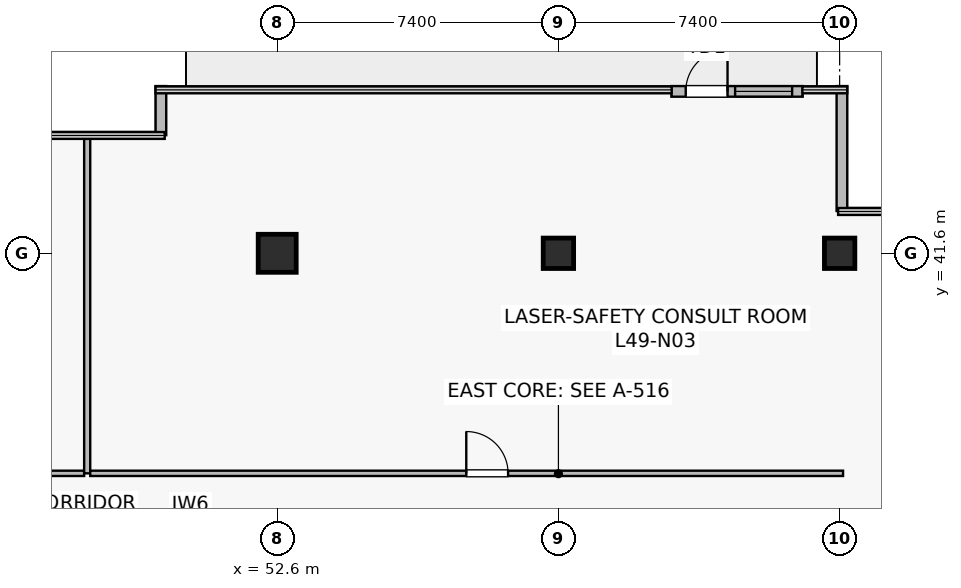
"""IFC4 building model, lengths in metres.
Left out: names, types, materials, properties, quantities, classifications, styles, units other than length and angle.
Written with IfcOpenShell. Run it as: python <this file> out.ifc"""

import sys

from ifc_helpers import new_model, si_unit, direction, frame, frame_2d, origin, origin_2d, place, context, subcontext, project, spatial, rectangle, extrude, source, transform, mapped, element, fill, save


model = new_model("IFC4")
c1 = context("Model", 3, precision=1e-05, world=origin(), true_north=direction((0.0, 1.0)))
c2 = subcontext(c1, "Body", "Model", "MODEL_VIEW")
j1 = project(units=[si_unit("LENGTHUNIT", "METRE"), si_unit("PLANEANGLEUNIT", "RADIAN")], contexts=[c1])
p1 = place(None, origin())
s1 = spatial("IfcSite", under=j1, at=p1, CompositionType="ELEMENT")
p2 = place(p1, origin())
s2 = spatial("IfcBuilding", under=s1, at=p2, CompositionType="ELEMENT")
p3 = place(p2, frame((0.0, 0.0, 205.5)))
s3 = spatial("IfcBuildingStorey", under=s2, at=p3, CompositionType="ELEMENT", Elevation=205.5)
m1 = source(origin(), c2, "Body", "SweptSolid", [
    extrude(rectangle(XDim=1.0, YDim=1.0, at=origin_2d()), origin(), (0.0, 0.0, 1.0), 4.1),
])
p4 = place(p3, frame((52.6, 41.6, 0.0), z_axis=(0.0, 0.0, 1.0), x_axis=(1.0, 0.0, 0.0)))
e1 = element("IfcColumn", 1, at=p4, inside=s3, PredefinedType="COLUMN", context=c2, shape_type="MappedRepresentation", body=[
    mapped(m1, transform((0.0, 0.0, 0.0), scale=1.0)),
])
m2 = source(origin(), c2, "Body", "SweptSolid", [
    extrude(rectangle(XDim=0.8, YDim=0.8, at=origin_2d()), origin(), (0.0, 0.0, 1.0), 4.1),
])
for number, where, z_axis, x_axis in (
    (2, (60.0, 41.6, 0.0), (0.0, 0.0, 1.0), (1.0, 0.0, 0.0)),
    (3, (67.4, 41.6, 0.0), (0.0, 0.0, 1.0), (1.0, 0.0, 0.0)),
):
    element("IfcColumn", number, at=place(p3, frame(where, z_axis=z_axis, x_axis=x_axis)), inside=s3, PredefinedType="COLUMN", context=c2, shape_type="MappedRepresentation", body=[
        mapped(m2, transform((0.0, 0.0, 0.0), scale=1.0)),
    ])
p5 = place(p3, frame((62.972, 45.86, 0.0), z_axis=(0.0, 0.0, 1.0), x_axis=(1.0, 0.0, 0.0)))
e4 = element("IfcWall", 4, at=p5, inside=s3, PredefinedType="STANDARD", context=c2, shape_type="SweptSolid", body=[
    extrude(rectangle(XDim=3.456, YDim=0.28, at=frame_2d((1.728, 0.0))), origin(), (0.0, 0.0, 1.0), 3.8),
])
p6 = place(p5, frame((0.378, 0.0, 0.0)))
e5 = element("IfcOpeningElement", 5, at=p6, cuts=e4, PredefinedType="OPENING", context=c2, shape_type="SweptSolid", body=[
    extrude(rectangle(XDim=1.1, YDim=2.2, at=frame_2d((0.55, 1.1))), frame((0.0, 0.15, 0.0), z_axis=(0.0, -1.0, 0.0), x_axis=(1.0, 0.0, 0.0)), (0.0, 0.0, 1.0), 0.3),
])
p7 = place(p5, frame((1.678, 0.0, 0.9)))
e6 = element("IfcOpeningElement", 6, at=p7, cuts=e4, PredefinedType="OPENING", context=c2, shape_type="SweptSolid", body=[
    extrude(rectangle(XDim=1.5, YDim=2.2, at=frame_2d((0.75, 1.1))), frame((0.0, 0.15, 0.0), z_axis=(0.0, -1.0, 0.0), x_axis=(1.0, 0.0, 0.0)), (0.0, 0.0, 1.0), 0.3),
])
p8 = place(p3, frame((67.46, 42.712, 0.0), z_axis=(0.0, 0.0, 1.0), x_axis=(0.0, 1.0, 0.0)))
e7 = element("IfcWall", 7, at=p8, inside=s3, PredefinedType="STANDARD", context=c2, shape_type="SweptSolid", body=[
    extrude(rectangle(XDim=3.288, YDim=0.28, at=frame_2d((1.644, 0.0))), origin(), (0.0, 0.0, 1.0), 3.8),
])
p9 = place(p3, frame((49.54, 46.0, 0.0), z_axis=(0.0, 0.0, 1.0), x_axis=(0.0, -1.0, 0.0)))
e8 = element("IfcWall", 8, at=p9, inside=s3, PredefinedType="STANDARD", context=c2, shape_type="SweptSolid", body=[
    extrude(rectangle(XDim=1.293, YDim=0.28, at=frame_2d((0.646, 0.0))), origin(), (0.0, 0.0, 1.0), 3.8),
])
p10 = place(p3, frame((23.88, 35.81, 0.0), z_axis=(0.0, 0.0, 1.0), x_axis=(1.0, 0.0, 0.0)))
e9 = element("IfcWall", 9, at=p10, inside=s3, PredefinedType="PARTITIONING", context=c2, shape_type="SweptSolid", body=[
    extrude(rectangle(XDim=23.64, YDim=0.14, at=frame_2d((11.82, 0.0))), origin(), (0.0, 0.0, 1.0), 3.197),
])
p11 = place(p10, frame((9.304, 0.0, 0.0)))
e10 = element("IfcOpeningElement", 10, at=p11, cuts=e9, PredefinedType="OPENING", context=c2, shape_type="SweptSolid", body=[
    extrude(rectangle(XDim=1.1, YDim=2.18, at=frame_2d((0.55, 1.09))), frame((0.0, 0.08, 0.0), z_axis=(0.0, -1.0, 0.0), x_axis=(1.0, 0.0, 0.0)), (0.0, 0.0, 1.0), 0.16),
])
p12 = place(p3, frame((47.6, 35.81, 0.0), z_axis=(0.0, 0.0, 1.0), x_axis=(0.0, 1.0, 0.0)))
e11 = element("IfcWall", 11, at=p12, inside=s3, PredefinedType="PARTITIONING", context=c2, shape_type="SweptSolid", body=[
    extrude(rectangle(XDim=8.88, YDim=0.16, at=frame_2d((4.44, 0.0))), origin(), (0.0, 0.0, 1.0), 3.135),
])
p13 = place(p3, frame((47.68, 35.81, 0.0), z_axis=(0.0, 0.0, 1.0), x_axis=(1.0, 0.0, 0.0)))
e12 = element("IfcWall", 12, at=p13, inside=s3, PredefinedType="PARTITIONING", context=c2, shape_type="SweptSolid", body=[
    extrude(rectangle(XDim=19.81, YDim=0.14, at=frame_2d((9.905, 0.0))), origin(), (0.0, 0.0, 1.0), 3.197),
])
p14 = place(p13, frame((9.895, 0.0, 0.0)))
e13 = element("IfcOpeningElement", 13, at=p14, cuts=e12, PredefinedType="OPENING", context=c2, shape_type="SweptSolid", body=[
    extrude(rectangle(XDim=1.1, YDim=2.18, at=frame_2d((0.55, 1.09))), frame((0.0, 0.08, 0.0), z_axis=(0.0, -1.0, 0.0), x_axis=(1.0, 0.0, 0.0)), (0.0, 0.0, 1.0), 0.16),
])
m3 = source(origin(), c2, "Body", "SweptSolid", [
    extrude(rectangle(XDim=1.1, YDim=2.2, at=frame_2d((0.55, 1.1))), frame((0.0, 0.025, 0.0), z_axis=(0.0, -1.0, 0.0), x_axis=(1.0, 0.0, 0.0)), (0.0, 0.0, 1.0), 0.05),
])
p15 = place(p6, origin())
e14 = element("IfcDoor", 14, at=p15, inside=s3, OperationType="SINGLE_SWING_RIGHT", PredefinedType="DOOR", context=c2, shape_type="MappedRepresentation", body=[
    mapped(m3, transform((0.0, 0.0, 0.0), scale=1.0)),
])
fill(e5, e14)
m4 = source(origin(), c2, "Body", "SweptSolid", [
    extrude(rectangle(XDim=1.5, YDim=2.2, at=frame_2d((0.75, 1.1))), frame((0.0, 0.03, 0.0), z_axis=(0.0, -1.0, 0.0), x_axis=(1.0, 0.0, 0.0)), (0.0, 0.0, 1.0), 0.06),
])
p16 = place(p7, origin())
e15 = element("IfcWindow", 15, at=p16, inside=s3, PartitioningType="SINGLE_PANEL", PredefinedType="WINDOW", context=c2, shape_type="MappedRepresentation", body=[
    mapped(m4, transform((0.0, 0.0, 0.0), scale=1.0)),
])
fill(e6, e15)
m5 = source(origin(), c2, "Body", "SweptSolid", [
    extrude(rectangle(XDim=1.1, YDim=2.18, at=frame_2d((0.55, 1.09))), frame((0.0, 0.025, 0.0), z_axis=(0.0, -1.0, 0.0), x_axis=(1.0, 0.0, 0.0)), (0.0, 0.0, 1.0), 0.05),
])
p17 = place(p14, origin())
e16 = element("IfcDoor", 16, at=p17, inside=s3, OperationType="SINGLE_SWING_LEFT", PredefinedType="DOOR", context=c2, shape_type="MappedRepresentation", body=[
    mapped(m5, transform((0.0, 0.0, 0.0), scale=1.0)),
])
fill(e13, e16)
save(model, sys.argv[1])
